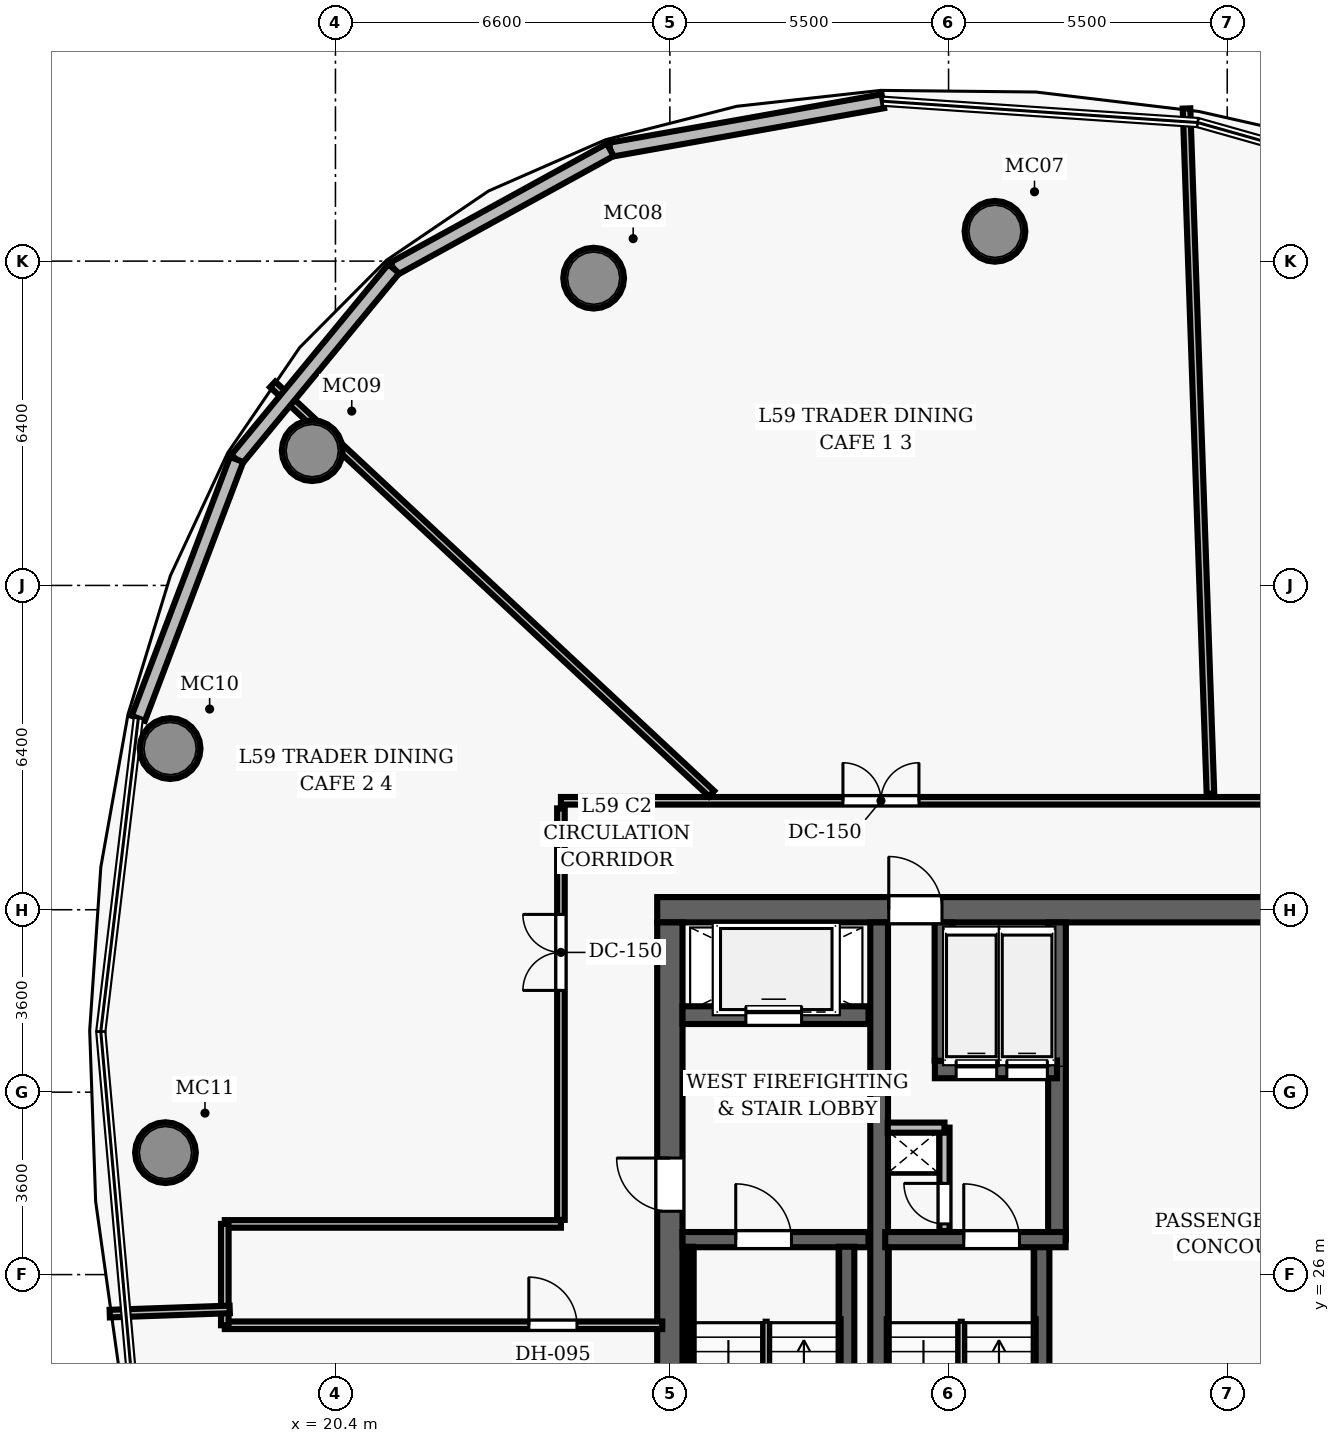
"""IFC4 building model, lengths in metres.
Left out: names, types, materials, properties, quantities, classifications, styles, units other than length and angle.
Written with IfcOpenShell. Run it as: python <this file> out.ifc"""

import sys

from ifc_helpers import new_model, si_unit, direction, frame, frame_2d, origin, origin_2d, place, context, subcontext, project, spatial, rectangle, hollow_circle, extrude, element, fill, save


model = new_model("IFC4")
c1 = context("Model", 3, precision=1e-05, world=origin(), true_north=direction((0.0, 1.0)))
c2 = subcontext(c1, "Body", "Model", "MODEL_VIEW")
j1 = project(units=[si_unit("LENGTHUNIT", "METRE"), si_unit("PLANEANGLEUNIT", "RADIAN")], contexts=[c1])
p1 = place(None, origin())
s1 = spatial("IfcSite", under=j1, at=p1, CompositionType="ELEMENT")
p2 = place(p1, origin())
s2 = spatial("IfcBuilding", under=s1, at=p2, CompositionType="ELEMENT")
p3 = place(p2, frame((0.0, 0.0, 232.8)))
s3 = spatial("IfcBuildingStorey", under=s2, at=p3, CompositionType="ELEMENT", Elevation=232.8)
p4 = place(p3, frame((26.75, 33.2, 0.0), z_axis=(0.0, 0.0, 1.0), x_axis=(1.0, 0.0, 0.0)))
e1 = element("IfcWall", 1, at=p4, inside=s3, PredefinedType="SHEAR", context=c2, shape_type="SweptSolid", body=[
    extrude(rectangle(XDim=22.5, YDim=0.5, at=frame_2d((11.25, 0.0))), origin(), (0.0, 0.0, 1.0), 3.85),
])
p5 = place(p4, frame((4.57, 0.0, 0.0)))
e2 = element("IfcOpeningElement", 2, at=p5, cuts=e1, PredefinedType="OPENING", context=c2, shape_type="SweptSolid", body=[
    extrude(rectangle(XDim=1.05, YDim=2.15, at=frame_2d((0.525, 1.075))), frame((0.0, 0.26, 0.0), z_axis=(0.0, -1.0, 0.0), x_axis=(1.0, 0.0, 0.0)), (0.0, 0.0, 1.0), 0.52),
])
p6 = place(p4, frame((14.47, 0.0, 0.0)))
e3 = element("IfcOpeningElement", 3, at=p6, cuts=e1, PredefinedType="OPENING", context=c2, shape_type="SweptSolid", body=[
    extrude(rectangle(XDim=1.05, YDim=2.15, at=frame_2d((0.525, 1.075))), frame((0.0, 0.26, 0.0), z_axis=(0.0, -1.0, 0.0), x_axis=(1.0, 0.0, 0.0)), (0.0, 0.0, 1.0), 0.52),
])
p7 = place(p3, frame((27.0, 19.05, 0.0), z_axis=(0.0, 0.0, 1.0), x_axis=(0.0, 1.0, 0.0)))
e4 = element("IfcWall", 4, at=p7, inside=s3, PredefinedType="SHEAR", context=c2, shape_type="SweptSolid", body=[
    extrude(rectangle(XDim=13.9, YDim=0.5, at=frame_2d((6.95, 0.0))), origin(), (0.0, 0.0, 1.0), 3.85),
])
p8 = place(p7, frame((8.2, 0.0, 0.0)))
e5 = element("IfcOpeningElement", 5, at=p8, cuts=e4, PredefinedType="OPENING", context=c2, shape_type="SweptSolid", body=[
    extrude(rectangle(XDim=1.05, YDim=2.15, at=frame_2d((0.525, 1.075))), frame((0.0, 0.26, 0.0), z_axis=(0.0, -1.0, 0.0), x_axis=(1.0, 0.0, 0.0)), (0.0, 0.0, 1.0), 0.52),
])
p9 = place(p3, frame((31.13, 19.05, 0.0), z_axis=(0.0, 0.0, 1.0), x_axis=(0.0, 1.0, 0.0)))
e6 = element("IfcWall", 6, at=p9, inside=s3, PredefinedType="SHEAR", context=c2, shape_type="SweptSolid", body=[
    extrude(rectangle(XDim=13.9, YDim=0.35, at=frame_2d((6.95, 0.0))), origin(), (0.0, 0.0, 1.0), 3.85),
])
for number, where, z_axis, x_axis in (
    (7, (33.416, 46.588, 0.0), (0.0, 0.0, 1.0), (1.0, 0.0, 0.0)),
    (8, (25.496, 45.664, 0.0), (0.0, 0.0, 1.0), (1.0, 0.0, 0.0)),
    (9, (19.942, 42.26, 0.0), (0.0, 0.0, 1.0), (1.0, 0.0, 0.0)),
    (10, (17.137, 36.381, 0.0), (0.0, 0.0, 1.0), (1.0, 0.0, 0.0)),
    (11, (17.045, 28.406, 0.0), (0.0, 0.0, 1.0), (1.0, 0.0, 0.0)),
):
    element("IfcColumn", number, at=place(p3, frame(where, z_axis=z_axis, x_axis=x_axis)), inside=s3, PredefinedType="COLUMN", context=c2, shape_type="SweptSolid", body=[
        extrude(hollow_circle(Radius=0.6, WallThickness=0.05, at=origin_2d()), origin(), (0.0, 0.0, 1.0), 3.85),
    ])
p10 = place(p3, frame((27.25, 26.69, 0.0), z_axis=(0.0, 0.0, 1.0), x_axis=(1.0, 0.0, 0.0)))
e12 = element("IfcWall", 12, at=p10, inside=s3, PredefinedType="SHEAR", context=c2, shape_type="SweptSolid", body=[
    extrude(rectangle(XDim=3.67, YDim=0.3, at=frame_2d((1.835, 0.0))), origin(), (0.0, 0.0, 1.0), 3.85),
])
p11 = place(p10, frame((1.05, 0.0, 0.0)))
e13 = element("IfcOpeningElement", 13, at=p11, cuts=e12, PredefinedType="OPENING", context=c2, shape_type="SweptSolid", body=[
    extrude(rectangle(XDim=1.1, YDim=2.15, at=frame_2d((0.55, 1.075))), frame((0.0, 0.16, 0.0), z_axis=(0.0, -1.0, 0.0), x_axis=(1.0, 0.0, 0.0)), (0.0, 0.0, 1.0), 0.32),
])
p12 = place(p3, frame((30.49, 19.05, 0.0), z_axis=(0.0, 0.0, 1.0), x_axis=(0.0, 1.0, 0.0)))
e14 = element("IfcWall", 14, at=p12, inside=s3, PredefinedType="SHEAR", context=c2, shape_type="SweptSolid", body=[
    extrude(rectangle(XDim=7.5, YDim=0.3, at=frame_2d((3.75, 0.0))), origin(), (0.0, 0.0, 1.0), 3.85),
])
p13 = place(p3, frame((27.395, 19.1, 0.0), z_axis=(0.0, 0.0, 1.0), x_axis=(0.0, 1.0, 0.0)))
e15 = element("IfcWall", 15, at=p13, inside=s3, PredefinedType="SHEAR", context=c2, shape_type="SweptSolid", body=[
    extrude(rectangle(XDim=7.45, YDim=0.12, at=frame_2d((3.725, 0.0))), origin(), (0.0, 0.0, 1.0), 3.85),
])
p14 = place(p3, frame((27.25, 31.12, 0.0), z_axis=(0.0, 0.0, 1.0), x_axis=(1.0, 0.0, 0.0)))
e16 = element("IfcWall", 16, at=p14, inside=s3, PredefinedType="SHEAR", context=c2, shape_type="SweptSolid", body=[
    extrude(rectangle(XDim=3.67, YDim=0.35, at=frame_2d((1.835, 0.0))), origin(), (0.0, 0.0, 1.0), 2.915),
])
p15 = place(p14, frame((1.25, 0.0, 0.0)))
e17 = element("IfcOpeningElement", 17, at=p15, cuts=e16, PredefinedType="OPENING", context=c2, shape_type="SweptSolid", body=[
    extrude(rectangle(XDim=1.1, YDim=2.15, at=frame_2d((0.55, 1.075))), frame((0.0, 0.185, 0.0), z_axis=(0.0, -1.0, 0.0), x_axis=(1.0, 0.0, 0.0)), (0.0, 0.0, 1.0), 0.37),
])
p16 = place(p3, frame((34.34, 19.05, 0.0), z_axis=(0.0, 0.0, 1.0), x_axis=(0.0, 1.0, 0.0)))
e18 = element("IfcWall", 18, at=p16, inside=s3, PredefinedType="SHEAR", context=c2, shape_type="SweptSolid", body=[
    extrude(rectangle(XDim=7.5, YDim=0.3, at=frame_2d((3.75, 0.0))), origin(), (0.0, 0.0, 1.0), 3.85),
])
p17 = place(p3, frame((34.64, 26.69, 0.0), z_axis=(0.0, 0.0, 1.0), x_axis=(0.0, 1.0, 0.0)))
e19 = element("IfcWall", 19, at=p17, inside=s3, PredefinedType="SHEAR", context=c2, shape_type="SweptSolid", body=[
    extrude(rectangle(XDim=6.26, YDim=0.35, at=frame_2d((3.13, 0.0))), origin(), (0.0, 0.0, 1.0), 3.85),
])
p18 = place(p3, frame((31.25, 26.69, 0.0), z_axis=(0.0, 0.0, 1.0), x_axis=(1.0, 0.0, 0.0)))
e20 = element("IfcWall", 20, at=p18, inside=s3, PredefinedType="SHEAR", context=c2, shape_type="SweptSolid", body=[
    extrude(rectangle(XDim=3.56, YDim=0.3, at=frame_2d((1.78, 0.0))), origin(), (0.0, 0.0, 1.0), 3.85),
])
p19 = place(p18, frame((1.55, 0.0, 0.0)))
e21 = element("IfcOpeningElement", 21, at=p19, cuts=e20, PredefinedType="OPENING", context=c2, shape_type="SweptSolid", body=[
    extrude(rectangle(XDim=1.1, YDim=2.15, at=frame_2d((0.55, 1.075))), frame((0.0, 0.16, 0.0), z_axis=(0.0, -1.0, 0.0), x_axis=(1.0, 0.0, 0.0)), (0.0, 0.0, 1.0), 0.32),
])
p20 = place(p3, frame((32.23, 30.05, 0.0), z_axis=(0.0, 0.0, 1.0), x_axis=(1.0, 0.0, 0.0)))
e22 = element("IfcWall", 22, at=p20, inside=s3, PredefinedType="SHEAR", context=c2, shape_type="SweptSolid", body=[
    extrude(rectangle(XDim=2.41, YDim=0.35, at=frame_2d((1.205, 0.0))), origin(), (0.0, 0.0, 1.0), 2.915),
])
p21 = place(p20, frame((0.42, 0.0, 0.0)))
e23 = element("IfcOpeningElement", 23, at=p21, cuts=e22, PredefinedType="OPENING", context=c2, shape_type="SweptSolid", body=[
    extrude(rectangle(XDim=0.8, YDim=2.15, at=frame_2d((0.4, 1.075))), frame((0.0, 0.185, 0.0), z_axis=(0.0, -1.0, 0.0), x_axis=(1.0, 0.0, 0.0)), (0.0, 0.0, 1.0), 0.37),
])
p22 = place(p20, frame((1.42, 0.0, 0.0)))
e24 = element("IfcOpeningElement", 24, at=p22, cuts=e22, PredefinedType="OPENING", context=c2, shape_type="SweptSolid", body=[
    extrude(rectangle(XDim=0.8, YDim=2.15, at=frame_2d((0.4, 1.075))), frame((0.0, 0.185, 0.0), z_axis=(0.0, -1.0, 0.0), x_axis=(1.0, 0.0, 0.0)), (0.0, 0.0, 1.0), 0.37),
])
p23 = place(p3, frame((32.4, 30.22, 0.0), z_axis=(0.0, 0.0, 1.0), x_axis=(0.0, 1.0, 0.0)))
e25 = element("IfcWall", 25, at=p23, inside=s3, PredefinedType="SHEAR", context=c2, shape_type="SweptSolid", body=[
    extrude(rectangle(XDim=2.73, YDim=0.35, at=frame_2d((1.365, 0.0))), origin(), (0.0, 0.0, 1.0), 2.915),
])
p24 = place(p3, frame((32.42, 26.86, 0.0), z_axis=(0.0, 0.0, 1.0), x_axis=(0.0, 1.0, 0.0)))
e26 = element("IfcWall", 26, at=p24, inside=s3, PredefinedType="PARTITIONING", context=c2, shape_type="SweptSolid", body=[
    extrude(rectangle(XDim=2.04, YDim=0.2, at=frame_2d((1.02, 0.0))), origin(), (0.0, 0.0, 1.0), 2.915),
])
p25 = place(p24, frame((0.14, 0.0, 0.0)))
e27 = element("IfcOpeningElement", 27, at=p25, cuts=e26, PredefinedType="OPENING", context=c2, shape_type="SweptSolid", body=[
    extrude(rectangle(XDim=0.8, YDim=2.05, at=frame_2d((0.4, 1.025))), frame((0.0, 0.11, 0.0), z_axis=(0.0, -1.0, 0.0), x_axis=(1.0, 0.0, 0.0)), (0.0, 0.0, 1.0), 0.22),
])
p26 = place(p3, frame((31.3, 28.9, 0.0), z_axis=(0.0, 0.0, 1.0), x_axis=(1.0, 0.0, 0.0)))
e28 = element("IfcWall", 28, at=p26, inside=s3, PredefinedType="PARTITIONING", context=c2, shape_type="SweptSolid", body=[
    extrude(rectangle(XDim=1.12, YDim=0.2, at=frame_2d((0.56, 0.0))), origin(), (0.0, 0.0, 1.0), 2.915),
])
p27 = place(p3, frame((24.85, 35.35, 0.0), z_axis=(0.0, 0.0, 1.0), x_axis=(1.0, 0.0, 0.0)))
e29 = element("IfcWall", 29, at=p27, inside=s3, PredefinedType="PARTITIONING", context=c2, shape_type="SweptSolid", body=[
    extrude(rectangle(XDim=26.0, YDim=0.15, at=frame_2d((13.0, 0.0))), origin(), (0.0, 0.0, 1.0), 2.915),
])
p28 = place(p27, frame((14.219, 0.0, 0.0)))
e30 = element("IfcOpeningElement", 30, at=p28, cuts=e29, PredefinedType="OPENING", context=c2, shape_type="SweptSolid", body=[
    extrude(rectangle(XDim=1.5, YDim=2.2, at=frame_2d((0.75, 1.1))), frame((0.0, 0.085, 0.0), z_axis=(0.0, -1.0, 0.0), x_axis=(1.0, 0.0, 0.0)), (0.0, 0.0, 1.0), 0.17),
])
p29 = place(p27, frame((5.566, 0.0, 0.0)))
e31 = element("IfcOpeningElement", 31, at=p29, cuts=e29, PredefinedType="OPENING", context=c2, shape_type="SweptSolid", body=[
    extrude(rectangle(XDim=1.5, YDim=2.2, at=frame_2d((0.75, 1.1))), frame((0.0, 0.085, 0.0), z_axis=(0.0, -1.0, 0.0), x_axis=(1.0, 0.0, 0.0)), (0.0, 0.0, 1.0), 0.17),
])
p30 = place(p3, frame((24.85, 27.08, 0.0), z_axis=(0.0, 0.0, 1.0), x_axis=(0.0, 1.0, 0.0)))
e32 = element("IfcWall", 32, at=p30, inside=s3, PredefinedType="PARTITIONING", context=c2, shape_type="SweptSolid", body=[
    extrude(rectangle(XDim=8.12, YDim=0.15, at=frame_2d((4.06, 0.0))), origin(), (0.0, 0.0, 1.0), 2.915),
])
p31 = place(p30, frame((4.528, 0.0, 0.0)))
e33 = element("IfcOpeningElement", 33, at=p31, cuts=e32, PredefinedType="OPENING", context=c2, shape_type="SweptSolid", body=[
    extrude(rectangle(XDim=1.5, YDim=2.2, at=frame_2d((0.75, 1.1))), frame((0.0, 0.085, 0.0), z_axis=(0.0, -1.0, 0.0), x_axis=(1.0, 0.0, 0.0)), (0.0, 0.0, 1.0), 0.17),
])
p32 = place(p3, frame((18.216, 27.0, 0.0), z_axis=(0.0, 0.0, 1.0), x_axis=(1.0, 0.0, 0.0)))
e34 = element("IfcWall", 34, at=p32, inside=s3, PredefinedType="PARTITIONING", context=c2, shape_type="SweptSolid", body=[
    extrude(rectangle(XDim=6.634, YDim=0.15, at=frame_2d((3.317, 0.0))), origin(), (0.0, 0.0, 1.0), 2.915),
])
p33 = place(p3, frame((18.216, 25.0, 0.0), z_axis=(0.0, 0.0, 1.0), x_axis=(1.0, 0.0, 0.0)))
e35 = element("IfcWall", 35, at=p33, inside=s3, PredefinedType="PARTITIONING", context=c2, shape_type="SweptSolid", body=[
    extrude(rectangle(XDim=8.634, YDim=0.15, at=frame_2d((4.317, 0.0))), origin(), (0.0, 0.0, 1.0), 2.915),
])
p34 = place(p33, frame((6.0, 0.0, 0.0)))
e36 = element("IfcOpeningElement", 36, at=p34, cuts=e35, PredefinedType="OPENING", context=c2, shape_type="SweptSolid", body=[
    extrude(rectangle(XDim=0.95, YDim=2.15, at=frame_2d((0.475, 1.075))), frame((0.0, 0.085, 0.0), z_axis=(0.0, -1.0, 0.0), x_axis=(1.0, 0.0, 0.0)), (0.0, 0.0, 1.0), 0.17),
])
p35 = place(p3, frame((18.216, 25.0, 0.0), z_axis=(0.0, 0.0, 1.0), x_axis=(0.0, 1.0, 0.0)))
e37 = element("IfcWall", 37, at=p35, inside=s3, PredefinedType="PARTITIONING", context=c2, shape_type="SweptSolid", body=[
    extrude(rectangle(XDim=2.0, YDim=0.15, at=frame_2d((1.0, 0.0))), origin(), (0.0, 0.0, 1.0), 2.915),
])
p36 = place(p3, frame((37.669, 35.49, 0.0), z_axis=(0.0, 0.0, 1.0), x_axis=(-0.034913436029, 0.99939034015, 0.0)))
e38 = element("IfcWall", 38, at=p36, inside=s3, PredefinedType="PARTITIONING", context=c2, shape_type="SweptSolid", body=[
    extrude(rectangle(XDim=13.531, YDim=0.15, at=frame_2d((6.766, 0.0))), origin(), (0.0, 0.0, 1.0), 2.915),
])
p37 = place(p3, frame((27.823, 35.49, 0.0), z_axis=(0.0, 0.0, 1.0), x_axis=(-0.73135953899, 0.681992100195, 0.0)))
e39 = element("IfcWall", 39, at=p37, inside=s3, PredefinedType="PARTITIONING", context=c2, shape_type="SweptSolid", body=[
    extrude(rectangle(XDim=11.844, YDim=0.15, at=frame_2d((5.922, 0.0))), origin(), (0.0, 0.0, 1.0), 2.915),
])
p38 = place(p3, frame((18.313, 25.312, 0.0), z_axis=(0.0, 0.0, 1.0), x_axis=(-0.999389861653, -0.034927130217, 0.0)))
e40 = element("IfcWall", 40, at=p38, inside=s3, PredefinedType="PARTITIONING", context=c2, shape_type="SweptSolid", body=[
    extrude(rectangle(XDim=2.37, YDim=0.15, at=frame_2d((1.185, 0.0))), origin(), (0.0, 0.0, 1.0), 2.915),
])
p39 = place(p3, frame((25.824, 48.198, 0.0), z_axis=(0.0, 0.0, 1.0), x_axis=(0.984520218029, 0.175271048073, 0.0)))
e41 = element("IfcWall", 41, at=p39, inside=s3, PredefinedType="SOLIDWALL", context=c2, shape_type="SweptSolid", body=[
    extrude(rectangle(XDim=5.464, YDim=0.28, at=frame_2d((2.732, 0.0))), origin(), (0.0, 0.0, 1.0), 3.5),
])
for number, where, z_axis, x_axis in (
    (42, (21.55, 45.85, 0.0), (0.0, 0.0, 1.0), (0.876, 0.481, 0.0)),
    (43, (18.449, 42.086, 0.0), (0.0, 0.0, 1.0), (0.636, 0.772, 0.0)),
):
    element("IfcWall", number, at=place(p3, frame(where, z_axis=z_axis, x_axis=x_axis)), inside=s3, PredefinedType="SOLIDWALL", context=c2, shape_type="SweptSolid", body=[
        extrude(rectangle(XDim=4.876, YDim=0.28, at=frame_2d((2.438, 0.0))), origin(), (0.0, 0.0, 1.0), 3.5),
    ])
p40 = place(p3, frame((16.509, 36.977, 0.0), z_axis=(0.0, 0.0, 1.0), x_axis=(0.355042078818, 0.934850320783, 0.0)))
e44 = element("IfcWall", 44, at=p40, inside=s3, PredefinedType="SOLIDWALL", context=c2, shape_type="SweptSolid", body=[
    extrude(rectangle(XDim=5.465, YDim=0.28, at=frame_2d((2.732, 0.0))), origin(), (0.0, 0.0, 1.0), 3.5),
])
p41 = place(p11, origin())
e45 = element("IfcDoor", 45, at=p41, inside=s3, OperationType="SINGLE_SWING_LEFT", PredefinedType="DOOR", context=c2, shape_type="SweptSolid", body=[
    extrude(rectangle(XDim=1.1, YDim=2.15, at=frame_2d((0.55, 1.075))), frame((0.0, 0.025, 0.0), z_axis=(0.0, -1.0, 0.0), x_axis=(1.0, 0.0, 0.0)), (0.0, 0.0, 1.0), 0.05),
])
fill(e13, e45)
p42 = place(p8, origin())
e46 = element("IfcDoor", 46, at=p42, inside=s3, OperationType="SINGLE_SWING_RIGHT", PredefinedType="DOOR", context=c2, shape_type="SweptSolid", body=[
    extrude(rectangle(XDim=1.05, YDim=2.15, at=frame_2d((0.525, 1.075))), frame((0.0, 0.025, 0.0), z_axis=(0.0, -1.0, 0.0), x_axis=(1.0, 0.0, 0.0)), (0.0, 0.0, 1.0), 0.05),
])
fill(e5, e46)
p43 = place(p19, origin())
e47 = element("IfcDoor", 47, at=p43, inside=s3, OperationType="SINGLE_SWING_LEFT", PredefinedType="DOOR", context=c2, shape_type="SweptSolid", body=[
    extrude(rectangle(XDim=1.1, YDim=2.15, at=frame_2d((0.55, 1.075))), frame((0.0, 0.025, 0.0), z_axis=(0.0, -1.0, 0.0), x_axis=(1.0, 0.0, 0.0)), (0.0, 0.0, 1.0), 0.05),
])
fill(e21, e47)
p44 = place(p25, origin())
e48 = element("IfcDoor", 48, at=p44, inside=s3, OperationType="SINGLE_SWING_RIGHT", PredefinedType="DOOR", context=c2, shape_type="SweptSolid", body=[
    extrude(rectangle(XDim=0.8, YDim=2.05, at=frame_2d((0.4, 1.025))), frame((0.0, 0.025, 0.0), z_axis=(0.0, -1.0, 0.0), x_axis=(1.0, 0.0, 0.0)), (0.0, 0.0, 1.0), 0.05),
])
fill(e27, e48)
p45 = place(p5, origin())
e49 = element("IfcDoor", 49, at=p45, inside=s3, OperationType="SINGLE_SWING_LEFT", PredefinedType="DOOR", context=c2, shape_type="SweptSolid", body=[
    extrude(rectangle(XDim=1.05, YDim=2.15, at=frame_2d((0.525, 1.075))), frame((0.0, 0.025, 0.0), z_axis=(0.0, -1.0, 0.0), x_axis=(1.0, 0.0, 0.0)), (0.0, 0.0, 1.0), 0.05),
])
fill(e2, e49)
p46 = place(p29, origin())
e50 = element("IfcDoor", 50, at=p46, inside=s3, OperationType="DOUBLE_DOOR_SINGLE_SWING", PredefinedType="DOOR", context=c2, shape_type="SweptSolid", body=[
    extrude(rectangle(XDim=1.5, YDim=2.2, at=frame_2d((0.75, 1.1))), frame((0.0, 0.025, 0.0), z_axis=(0.0, -1.0, 0.0), x_axis=(1.0, 0.0, 0.0)), (0.0, 0.0, 1.0), 0.05),
])
fill(e31, e50)
p47 = place(p31, origin())
e51 = element("IfcDoor", 51, at=p47, inside=s3, OperationType="DOUBLE_DOOR_SINGLE_SWING", PredefinedType="DOOR", context=c2, shape_type="SweptSolid", body=[
    extrude(rectangle(XDim=1.5, YDim=2.2, at=frame_2d((0.75, 1.1))), frame((0.0, 0.025, 0.0), z_axis=(0.0, -1.0, 0.0), x_axis=(1.0, 0.0, 0.0)), (0.0, 0.0, 1.0), 0.05),
])
fill(e33, e51)
p48 = place(p34, origin())
e52 = element("IfcDoor", 52, at=p48, inside=s3, OperationType="SINGLE_SWING_LEFT", PredefinedType="DOOR", context=c2, shape_type="SweptSolid", body=[
    extrude(rectangle(XDim=0.95, YDim=2.15, at=frame_2d((0.475, 1.075))), frame((0.0, 0.025, 0.0), z_axis=(0.0, -1.0, 0.0), x_axis=(1.0, 0.0, 0.0)), (0.0, 0.0, 1.0), 0.05),
])
fill(e36, e52)
p49 = place(p15, origin())
e53 = element("IfcDoor", 53, at=p49, inside=s3, OperationType="SLIDING_TO_LEFT", PredefinedType="DOOR", context=c2, shape_type="SweptSolid", body=[
    extrude(rectangle(XDim=1.1, YDim=2.15, at=frame_2d((0.55, 1.075))), frame((0.0, 0.025, 0.0), z_axis=(0.0, -1.0, 0.0), x_axis=(1.0, 0.0, 0.0)), (0.0, 0.0, 1.0), 0.05),
])
fill(e17, e53)
p50 = place(p21, origin())
e54 = element("IfcDoor", 54, at=p50, inside=s3, OperationType="SLIDING_TO_LEFT", PredefinedType="DOOR", context=c2, shape_type="SweptSolid", body=[
    extrude(rectangle(XDim=0.8, YDim=2.15, at=frame_2d((0.4, 1.075))), frame((0.0, 0.025, 0.0), z_axis=(0.0, -1.0, 0.0), x_axis=(1.0, 0.0, 0.0)), (0.0, 0.0, 1.0), 0.05),
])
fill(e23, e54)
p51 = place(p22, origin())
e55 = element("IfcDoor", 55, at=p51, inside=s3, OperationType="SLIDING_TO_LEFT", PredefinedType="DOOR", context=c2, shape_type="SweptSolid", body=[
    extrude(rectangle(XDim=0.8, YDim=2.15, at=frame_2d((0.4, 1.075))), frame((0.0, 0.025, 0.0), z_axis=(0.0, -1.0, 0.0), x_axis=(1.0, 0.0, 0.0)), (0.0, 0.0, 1.0), 0.05),
])
fill(e24, e55)
save(model, sys.argv[1])
